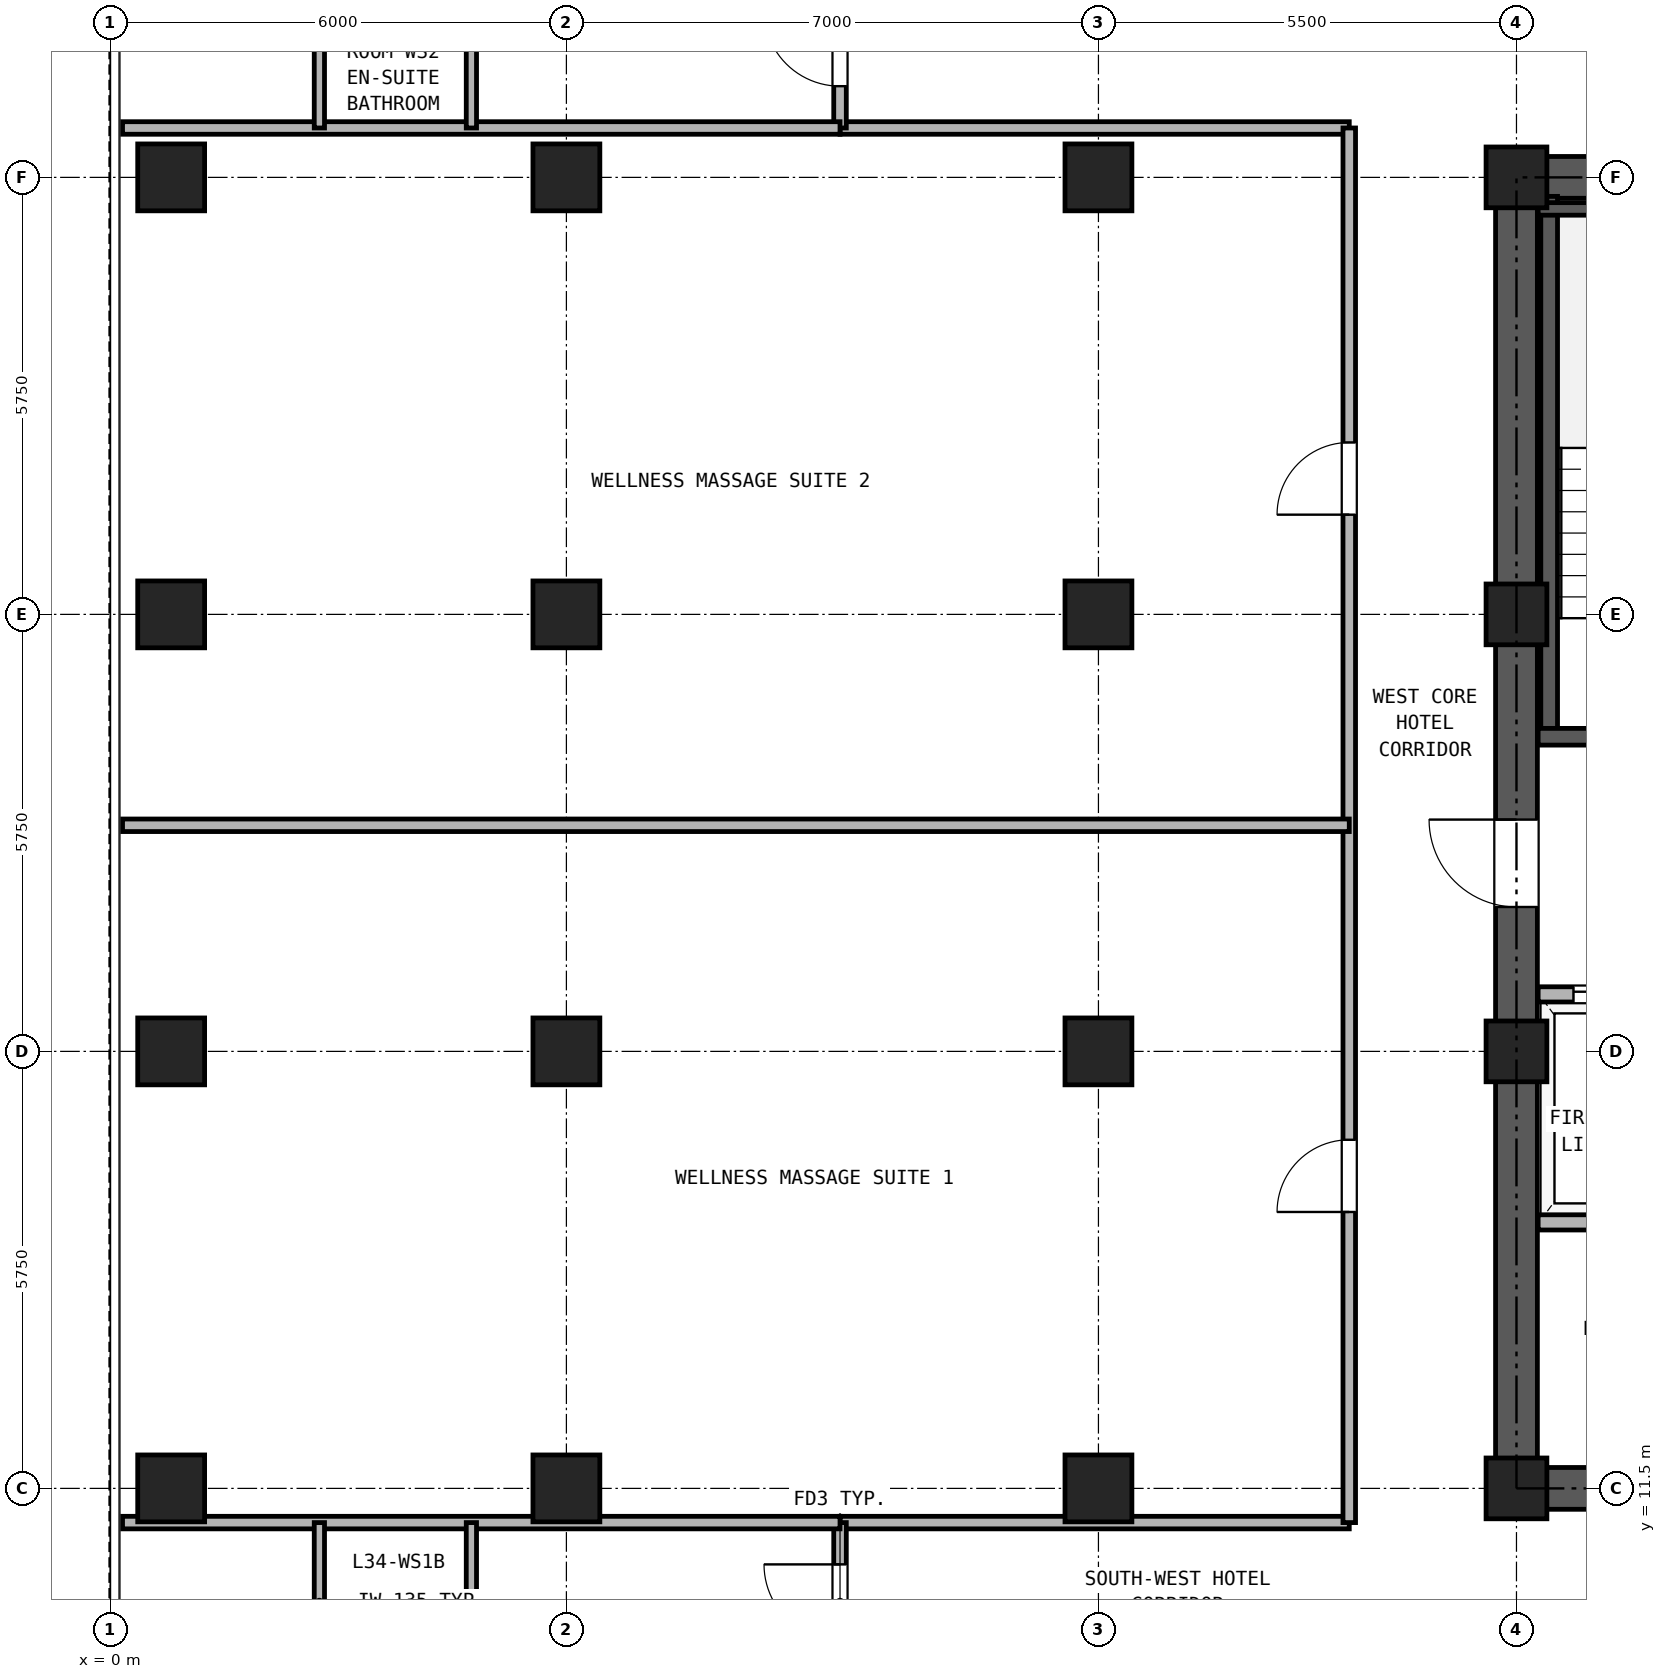
"""IFC4 building model, lengths in metres.
Left out: names, types, materials, properties, quantities, classifications, styles, units other than length and angle.
Written with IfcOpenShell. Run it as: python <this file> out.ifc"""

import sys

from ifc_helpers import new_model, si_unit, direction, frame, frame_2d, origin, origin_2d, place, context, subcontext, project, spatial, rectangle, hollow_rectangle, extrude, source, transform, mapped, element, fill, save


model = new_model("IFC4")
c1 = context("Model", 3, precision=1e-05, world=origin(), true_north=direction((0.0, 1.0)))
c2 = subcontext(c1, "Body", "Model", "MODEL_VIEW")
j1 = project(units=[si_unit("LENGTHUNIT", "METRE"), si_unit("PLANEANGLEUNIT", "RADIAN")], contexts=[c1])
p1 = place(None, origin())
s1 = spatial("IfcSite", under=j1, at=p1, CompositionType="ELEMENT")
p2 = place(p1, origin())
s2 = spatial("IfcBuilding", under=s1, at=p2, CompositionType="ELEMENT")
p3 = place(p2, frame((0.0, 0.0, 124.7)))
s3 = spatial("IfcBuildingStorey", under=s2, at=p3, CompositionType="ELEMENT", Elevation=124.7)
m1 = source(origin(), c2, "Body", "SweptSolid", [
    extrude(hollow_rectangle(XDim=0.88, YDim=0.88, WallThickness=0.05, at=origin_2d()), origin(), (0.0, 0.0, 1.0), 2.95),
])
for number, where, z_axis, x_axis in (
    (1, (0.8, 11.5, 0.0), (0.0, 0.0, 1.0), (1.0, 0.0, 0.0)),
    (2, (0.8, 17.25, 0.0), (0.0, 0.0, 1.0), (1.0, 0.0, 0.0)),
    (3, (0.8, 23.0, 0.0), (0.0, 0.0, 1.0), (1.0, 0.0, 0.0)),
    (4, (0.8, 28.75, 0.0), (0.0, 0.0, 1.0), (1.0, 0.0, 0.0)),
    (5, (6.0, 11.5, 0.0), (0.0, 0.0, 1.0), (1.0, 0.0, 0.0)),
    (6, (6.0, 17.25, 0.0), (0.0, 0.0, 1.0), (1.0, 0.0, 0.0)),
    (7, (6.0, 23.0, 0.0), (0.0, 0.0, 1.0), (1.0, 0.0, 0.0)),
    (8, (6.0, 28.75, 0.0), (0.0, 0.0, 1.0), (1.0, 0.0, 0.0)),
    (9, (13.0, 11.5, 0.0), (0.0, 0.0, 1.0), (1.0, 0.0, 0.0)),
    (10, (13.0, 17.25, 0.0), (0.0, 0.0, 1.0), (1.0, 0.0, 0.0)),
    (11, (13.0, 23.0, 0.0), (0.0, 0.0, 1.0), (1.0, 0.0, 0.0)),
    (12, (13.0, 28.75, 0.0), (0.0, 0.0, 1.0), (1.0, 0.0, 0.0)),
):
    element("IfcColumn", number, at=place(p3, frame(where, z_axis=z_axis, x_axis=x_axis)), inside=s3, PredefinedType="COLUMN", context=c2, shape_type="MappedRepresentation", body=[
        mapped(m1, transform((0.0, 0.0, 0.0), x_axis=(1.0, 0.0, 0.0), y_axis=(0.0, 1.0, 0.0), z_axis=(0.0, 0.0, 1.0), scale=1.0)),
    ])
m2 = source(origin(), c2, "Body", "SweptSolid", [
    extrude(hollow_rectangle(XDim=0.8, YDim=0.8, WallThickness=0.045, at=origin_2d()), origin(), (0.0, 0.0, 1.0), 2.95),
])
for number, where, z_axis, x_axis in (
    (13, (18.5, 11.5, 0.0), (0.0, 0.0, 1.0), (1.0, 0.0, 0.0)),
    (14, (18.5, 17.25, 0.0), (0.0, 0.0, 1.0), (1.0, 0.0, 0.0)),
    (15, (18.5, 23.0, 0.0), (0.0, 0.0, 1.0), (1.0, 0.0, 0.0)),
    (16, (18.5, 28.75, 0.0), (0.0, 0.0, 1.0), (1.0, 0.0, 0.0)),
):
    element("IfcColumn", number, at=place(p3, frame(where, z_axis=z_axis, x_axis=x_axis)), inside=s3, PredefinedType="COLUMN", context=c2, shape_type="MappedRepresentation", body=[
        mapped(m2, transform((0.0, 0.0, 0.0), x_axis=(1.0, 0.0, 0.0), y_axis=(0.0, 1.0, 0.0), z_axis=(0.0, 0.0, 1.0), scale=1.0)),
    ])
p4 = place(p3, frame((18.225, 11.5, 0.0), z_axis=(0.0, 0.0, 1.0), x_axis=(1.0, 0.0, 0.0)))
e17 = element("IfcWall", 17, at=p4, inside=s3, PredefinedType="SHEAR", context=c2, shape_type="SweptSolid", body=[
    extrude(rectangle(XDim=10.55, YDim=0.55, at=frame_2d((5.275, 0.0))), origin(), (0.0, 0.0, 1.0), 2.95),
])
p5 = place(p4, frame((2.375, 0.0, 0.0)))
e18 = element("IfcOpeningElement", 18, at=p5, cuts=e17, PredefinedType="OPENING", context=c2, shape_type="SweptSolid", body=[
    extrude(rectangle(XDim=0.95, YDim=2.15, at=frame_2d((0.475, 1.075))), frame((0.0, 0.285, 0.0), z_axis=(0.0, -1.0, 0.0), x_axis=(1.0, 0.0, 0.0)), (0.0, 0.0, 1.0), 0.57),
])
p6 = place(p4, frame((5.875, 0.0, 0.0)))
e19 = element("IfcOpeningElement", 19, at=p6, cuts=e17, PredefinedType="OPENING", context=c2, shape_type="SweptSolid", body=[
    extrude(rectangle(XDim=1.1, YDim=2.25, at=frame_2d((0.55, 1.125))), frame((0.0, 0.285, 0.0), z_axis=(0.0, -1.0, 0.0), x_axis=(1.0, 0.0, 0.0)), (0.0, 0.0, 1.0), 0.57),
])
p7 = place(p4, frame((8.275, 0.0, 0.0)))
e20 = element("IfcOpeningElement", 20, at=p7, cuts=e17, PredefinedType="OPENING", context=c2, shape_type="SweptSolid", body=[
    extrude(rectangle(XDim=1.1, YDim=2.25, at=frame_2d((0.55, 1.125))), frame((0.0, 0.285, 0.0), z_axis=(0.0, -1.0, 0.0), x_axis=(1.0, 0.0, 0.0)), (0.0, 0.0, 1.0), 0.57),
])
p8 = place(p3, frame((18.225, 28.75, 0.0), z_axis=(0.0, 0.0, 1.0), x_axis=(1.0, 0.0, 0.0)))
e21 = element("IfcWall", 21, at=p8, inside=s3, PredefinedType="SHEAR", context=c2, shape_type="SweptSolid", body=[
    extrude(rectangle(XDim=10.55, YDim=0.55, at=frame_2d((5.275, 0.0))), origin(), (0.0, 0.0, 1.0), 2.95),
])
p9 = place(p8, frame((4.155, 0.0, 0.0)))
e22 = element("IfcOpeningElement", 22, at=p9, cuts=e21, PredefinedType="OPENING", context=c2, shape_type="SweptSolid", body=[
    extrude(rectangle(XDim=0.9, YDim=2.05, at=frame_2d((0.45, 1.025))), frame((0.0, 0.285, 0.0), z_axis=(0.0, -1.0, 0.0), x_axis=(1.0, 0.0, 0.0)), (0.0, 0.0, 1.0), 0.57),
])
p10 = place(p8, frame((5.695, 0.0, 0.0)))
e23 = element("IfcOpeningElement", 23, at=p10, cuts=e21, PredefinedType="OPENING", context=c2, shape_type="SweptSolid", body=[
    extrude(rectangle(XDim=0.9, YDim=2.05, at=frame_2d((0.45, 1.025))), frame((0.0, 0.285, 0.0), z_axis=(0.0, -1.0, 0.0), x_axis=(1.0, 0.0, 0.0)), (0.0, 0.0, 1.0), 0.57),
])
p11 = place(p3, frame((18.5, 11.775, 0.0), z_axis=(0.0, 0.0, 1.0), x_axis=(0.0, 1.0, 0.0)))
e24 = element("IfcWall", 24, at=p11, inside=s3, PredefinedType="SHEAR", context=c2, shape_type="SweptSolid", body=[
    extrude(rectangle(XDim=16.7, YDim=0.55, at=frame_2d((8.35, 0.0))), origin(), (0.0, 0.0, 1.0), 2.95),
])
p12 = place(p11, frame((7.375, 0.0, 0.0)))
e25 = element("IfcOpeningElement", 25, at=p12, cuts=e24, PredefinedType="OPENING", context=c2, shape_type="SweptSolid", body=[
    extrude(rectangle(XDim=1.15, YDim=2.2, at=frame_2d((0.575, 1.1))), frame((0.0, 0.285, 0.0), z_axis=(0.0, -1.0, 0.0), x_axis=(1.0, 0.0, 0.0)), (0.0, 0.0, 1.0), 0.57),
])
p13 = place(p3, frame((18.93, 21.39, 0.0), z_axis=(0.0, 0.0, 1.0), x_axis=(0.0, 1.0, 0.0)))
e26 = element("IfcWall", 26, at=p13, inside=s3, PredefinedType="SOLIDWALL", context=c2, shape_type="SweptSolid", body=[
    extrude(rectangle(XDim=7.11, YDim=0.22, at=frame_2d((3.555, 0.0))), origin(), (0.0, 0.0, 1.0), 2.95),
])
p14 = place(p3, frame((18.785, 28.335, 0.0), z_axis=(0.0, 0.0, 1.0), x_axis=(1.0, 0.0, 0.0)))
e27 = element("IfcWall", 27, at=p14, inside=s3, PredefinedType="PARTITIONING", context=c2, shape_type="SweptSolid", body=[
    extrude(rectangle(XDim=3.325, YDim=0.165, at=frame_2d((1.663, 0.0))), origin(), (0.0, 0.0, 1.0), 2.95),
])
p15 = place(p3, frame((18.785, 21.39, 0.0), z_axis=(0.0, 0.0, 1.0), x_axis=(1.0, 0.0, 0.0)))
e28 = element("IfcWall", 28, at=p15, inside=s3, PredefinedType="SOLIDWALL", context=c2, shape_type="SweptSolid", body=[
    extrude(rectangle(XDim=6.345, YDim=0.22, at=frame_2d((3.172, 0.0))), origin(), (0.0, 0.0, 1.0), 2.95),
])
p16 = place(p15, frame((1.065, 0.0, 0.0)))
e29 = element("IfcOpeningElement", 29, at=p16, cuts=e28, PredefinedType="OPENING", context=c2, shape_type="SweptSolid", body=[
    extrude(rectangle(XDim=1.15, YDim=2.2, at=frame_2d((0.575, 1.1))), frame((0.0, 0.12, 0.0), z_axis=(0.0, -1.0, 0.0), x_axis=(1.0, 0.0, 0.0)), (0.0, 0.0, 1.0), 0.24),
])
p17 = place(p15, frame((4.795, 0.0, 0.0)))
e30 = element("IfcOpeningElement", 30, at=p17, cuts=e28, PredefinedType="OPENING", context=c2, shape_type="SweptSolid", body=[
    extrude(rectangle(XDim=1.1, YDim=2.25, at=frame_2d((0.55, 1.125))), frame((0.0, 0.12, 0.0), z_axis=(0.0, -1.0, 0.0), x_axis=(1.0, 0.0, 0.0)), (0.0, 0.0, 1.0), 0.24),
])
p18 = place(p3, frame((18.785, 18.0, 0.0), z_axis=(0.0, 0.0, 1.0), x_axis=(1.0, 0.0, 0.0)))
e31 = element("IfcWall", 31, at=p18, inside=s3, PredefinedType="PARTITIONING", context=c2, shape_type="SweptSolid", body=[
    extrude(rectangle(XDim=9.43, YDim=0.2, at=frame_2d((4.715, 0.0))), origin(), (0.0, 0.0, 1.0), 2.95),
])
p19 = place(p18, frame((0.465, 0.0, 0.0)))
e32 = element("IfcOpeningElement", 32, at=p19, cuts=e31, PredefinedType="OPENING", context=c2, shape_type="SweptSolid", body=[
    extrude(rectangle(XDim=1.3, YDim=2.3, at=frame_2d((0.65, 1.15))), frame((0.0, 0.11, 0.0), z_axis=(0.0, -1.0, 0.0), x_axis=(1.0, 0.0, 0.0)), (0.0, 0.0, 1.0), 0.22),
])
p20 = place(p18, frame((2.565, 0.0, 0.0)))
e33 = element("IfcOpeningElement", 33, at=p20, cuts=e31, PredefinedType="OPENING", context=c2, shape_type="SweptSolid", body=[
    extrude(rectangle(XDim=1.3, YDim=2.3, at=frame_2d((0.65, 1.15))), frame((0.0, 0.11, 0.0), z_axis=(0.0, -1.0, 0.0), x_axis=(1.0, 0.0, 0.0)), (0.0, 0.0, 1.0), 0.22),
])
p21 = place(p18, frame((7.065, 0.0, 0.0)))
e34 = element("IfcOpeningElement", 34, at=p21, cuts=e31, PredefinedType="OPENING", context=c2, shape_type="SweptSolid", body=[
    extrude(rectangle(XDim=1.0, YDim=2.15, at=frame_2d((0.5, 1.075))), frame((0.0, 0.11, 0.0), z_axis=(0.0, -1.0, 0.0), x_axis=(1.0, 0.0, 0.0)), (0.0, 0.0, 1.0), 0.22),
])
p22 = place(p3, frame((18.785, 15.0, 0.0), z_axis=(0.0, 0.0, 1.0), x_axis=(1.0, 0.0, 0.0)))
e35 = element("IfcWall", 35, at=p22, inside=s3, PredefinedType="PARTITIONING", context=c2, shape_type="SweptSolid", body=[
    extrude(rectangle(XDim=9.43, YDim=0.2, at=frame_2d((4.715, 0.0))), origin(), (0.0, 0.0, 1.0), 2.95),
])
for number, where, z_axis, x_axis in (
    (36, (9.6, 11.05, 0.0), (0.0, 0.0, 1.0), (1.0, 0.0, 0.0)),
    (37, (9.6, 29.4, 0.0), (0.0, 0.0, 1.0), (1.0, 0.0, 0.0)),
):
    element("IfcWall", number, at=place(p3, frame(where, z_axis=z_axis, x_axis=x_axis)), inside=s3, PredefinedType="PARTITIONING", context=c2, shape_type="SweptSolid", body=[
        extrude(rectangle(XDim=6.7, YDim=0.165, at=frame_2d((3.35, 0.0))), origin(), (0.0, 0.0, 1.0), 2.95),
    ])
p23 = place(p3, frame((16.3, 11.05, 0.0), z_axis=(0.0, 0.0, 1.0), x_axis=(0.0, 1.0, 0.0)))
e38 = element("IfcWall", 38, at=p23, inside=s3, PredefinedType="PARTITIONING", context=c2, shape_type="SweptSolid", body=[
    extrude(rectangle(XDim=18.35, YDim=0.165, at=frame_2d((9.175, 0.0))), origin(), (0.0, 0.0, 1.0), 2.95),
])
p24 = place(p23, frame((4.087, 0.0, 0.0)))
e39 = element("IfcOpeningElement", 39, at=p24, cuts=e38, PredefinedType="OPENING", context=c2, shape_type="SweptSolid", body=[
    extrude(rectangle(XDim=0.95, YDim=2.15, at=frame_2d((0.475, 1.075))), frame((0.0, 0.093, 0.0), z_axis=(0.0, -1.0, 0.0), x_axis=(1.0, 0.0, 0.0)), (0.0, 0.0, 1.0), 0.185),
])
p25 = place(p23, frame((13.262, 0.0, 0.0)))
e40 = element("IfcOpeningElement", 40, at=p25, cuts=e38, PredefinedType="OPENING", context=c2, shape_type="SweptSolid", body=[
    extrude(rectangle(XDim=0.95, YDim=2.15, at=frame_2d((0.475, 1.075))), frame((0.0, 0.093, 0.0), z_axis=(0.0, -1.0, 0.0), x_axis=(1.0, 0.0, 0.0)), (0.0, 0.0, 1.0), 0.185),
])
p26 = place(p3, frame((9.6, 0.16, 0.0), z_axis=(0.0, 0.0, 1.0), x_axis=(0.0, 1.0, 0.0)))
e41 = element("IfcWall", 41, at=p26, inside=s3, PredefinedType="PARTITIONING", context=c2, shape_type="SweptSolid", body=[
    extrude(rectangle(XDim=10.89, YDim=0.165, at=frame_2d((5.445, 0.0))), origin(), (0.0, 0.0, 1.0), 2.95),
])
p27 = place(p26, frame((9.34, 0.0, 0.0)))
e42 = element("IfcOpeningElement", 42, at=p27, cuts=e41, PredefinedType="OPENING", context=c2, shape_type="SweptSolid", body=[
    extrude(rectangle(XDim=1.0, YDim=2.15, at=frame_2d((0.5, 1.075))), frame((0.0, 0.093, 0.0), z_axis=(0.0, -1.0, 0.0), x_axis=(1.0, 0.0, 0.0)), (0.0, 0.0, 1.0), 0.185),
])
p28 = place(p3, frame((9.6, 29.4, 0.0), z_axis=(0.0, 0.0, 1.0), x_axis=(0.0, 1.0, 0.0)))
e43 = element("IfcWall", 43, at=p28, inside=s3, PredefinedType="PARTITIONING", context=c2, shape_type="SweptSolid", body=[
    extrude(rectangle(XDim=5.74, YDim=0.165, at=frame_2d((2.87, 0.0))), origin(), (0.0, 0.0, 1.0), 2.95),
])
p29 = place(p28, frame((0.55, 0.0, 0.0)))
e44 = element("IfcOpeningElement", 44, at=p29, cuts=e43, PredefinedType="OPENING", context=c2, shape_type="SweptSolid", body=[
    extrude(rectangle(XDim=1.0, YDim=2.15, at=frame_2d((0.5, 1.075))), frame((0.0, 0.093, 0.0), z_axis=(0.0, -1.0, 0.0), x_axis=(1.0, 0.0, 0.0)), (0.0, 0.0, 1.0), 0.185),
])
for number, where, z_axis, x_axis in (
    (45, (0.16, 11.05, 0.0), (0.0, 0.0, 1.0), (1.0, 0.0, 0.0)),
    (46, (0.16, 29.4, 0.0), (0.0, 0.0, 1.0), (1.0, 0.0, 0.0)),
):
    element("IfcWall", number, at=place(p3, frame(where, z_axis=z_axis, x_axis=x_axis)), inside=s3, PredefinedType="PARTITIONING", context=c2, shape_type="SweptSolid", body=[
        extrude(rectangle(XDim=9.44, YDim=0.165, at=frame_2d((4.72, 0.0))), origin(), (0.0, 0.0, 1.0), 2.95),
    ])
for number, where, z_axis, x_axis in (
    (47, (2.75, 8.95, 0.0), (0.0, 0.0, 1.0), (0.0, 1.0, 0.0)),
    (48, (4.75, 8.95, 0.0), (0.0, 0.0, 1.0), (0.0, 1.0, 0.0)),
    (49, (2.75, 29.4, 0.0), (0.0, 0.0, 1.0), (0.0, 1.0, 0.0)),
    (50, (4.75, 29.4, 0.0), (0.0, 0.0, 1.0), (0.0, 1.0, 0.0)),
):
    element("IfcWall", number, at=place(p3, frame(where, z_axis=z_axis, x_axis=x_axis)), inside=s3, PredefinedType="PARTITIONING", context=c2, shape_type="SweptSolid", body=[
        extrude(rectangle(XDim=2.1, YDim=0.135, at=frame_2d((1.05, 0.0))), origin(), (0.0, 0.0, 1.0), 2.95),
    ])
p30 = place(p3, frame((0.16, 20.225, 0.0), z_axis=(0.0, 0.0, 1.0), x_axis=(1.0, 0.0, 0.0)))
e51 = element("IfcWall", 51, at=p30, inside=s3, PredefinedType="PARTITIONING", context=c2, shape_type="SweptSolid", body=[
    extrude(rectangle(XDim=16.14, YDim=0.165, at=frame_2d((8.07, 0.0))), origin(), (0.0, 0.0, 1.0), 2.583),
])
p31 = place(p19, origin())
e52 = element("IfcDoor", 52, at=p31, inside=s3, OperationType="DOUBLE_DOOR_SLIDING", PredefinedType="DOOR", context=c2, shape_type="SweptSolid", body=[
    extrude(rectangle(XDim=1.3, YDim=2.3, at=frame_2d((0.65, 1.15))), frame((0.0, 0.025, 0.0), z_axis=(0.0, -1.0, 0.0), x_axis=(1.0, 0.0, 0.0)), (0.0, 0.0, 1.0), 0.05),
])
fill(e32, e52)
p32 = place(p12, frame((1.15, 0.0, 0.0), z_axis=(0.0, 0.0, 1.0), x_axis=(-1.0, 0.0, 0.0)))
e53 = element("IfcDoor", 53, at=p32, inside=s3, OperationType="SINGLE_SWING_RIGHT", PredefinedType="DOOR", context=c2, shape_type="SweptSolid", body=[
    extrude(rectangle(XDim=1.15, YDim=2.2, at=frame_2d((0.575, 1.1))), frame((0.0, 0.025, 0.0), z_axis=(0.0, -1.0, 0.0), x_axis=(1.0, 0.0, 0.0)), (0.0, 0.0, 1.0), 0.05),
])
fill(e25, e53)
p33 = place(p27, origin())
e54 = element("IfcDoor", 54, at=p33, inside=s3, OperationType="SINGLE_SWING_RIGHT", PredefinedType="DOOR", context=c2, shape_type="SweptSolid", body=[
    extrude(rectangle(XDim=1.0, YDim=2.15, at=frame_2d((0.5, 1.075))), frame((0.0, 0.025, 0.0), z_axis=(0.0, -1.0, 0.0), x_axis=(1.0, 0.0, 0.0)), (0.0, 0.0, 1.0), 0.05),
])
fill(e42, e54)
p34 = place(p29, origin())
e55 = element("IfcDoor", 55, at=p34, inside=s3, OperationType="SINGLE_SWING_RIGHT", PredefinedType="DOOR", context=c2, shape_type="SweptSolid", body=[
    extrude(rectangle(XDim=1.0, YDim=2.15, at=frame_2d((0.5, 1.075))), frame((0.0, 0.025, 0.0), z_axis=(0.0, -1.0, 0.0), x_axis=(1.0, 0.0, 0.0)), (0.0, 0.0, 1.0), 0.05),
])
fill(e44, e55)
p35 = place(p24, frame((0.95, 0.0, 0.0), z_axis=(0.0, 0.0, 1.0), x_axis=(-1.0, 0.0, 0.0)))
e56 = element("IfcDoor", 56, at=p35, inside=s3, OperationType="SINGLE_SWING_LEFT", PredefinedType="DOOR", context=c2, shape_type="SweptSolid", body=[
    extrude(rectangle(XDim=0.95, YDim=2.15, at=frame_2d((0.475, 1.075))), frame((0.0, 0.025, 0.0), z_axis=(0.0, -1.0, 0.0), x_axis=(1.0, 0.0, 0.0)), (0.0, 0.0, 1.0), 0.05),
])
fill(e39, e56)
p36 = place(p25, frame((0.95, 0.0, 0.0), z_axis=(0.0, 0.0, 1.0), x_axis=(-1.0, 0.0, 0.0)))
e57 = element("IfcDoor", 57, at=p36, inside=s3, OperationType="SINGLE_SWING_LEFT", PredefinedType="DOOR", context=c2, shape_type="SweptSolid", body=[
    extrude(rectangle(XDim=0.95, YDim=2.15, at=frame_2d((0.475, 1.075))), frame((0.0, 0.025, 0.0), z_axis=(0.0, -1.0, 0.0), x_axis=(1.0, 0.0, 0.0)), (0.0, 0.0, 1.0), 0.05),
])
fill(e40, e57)
save(model, sys.argv[1])
